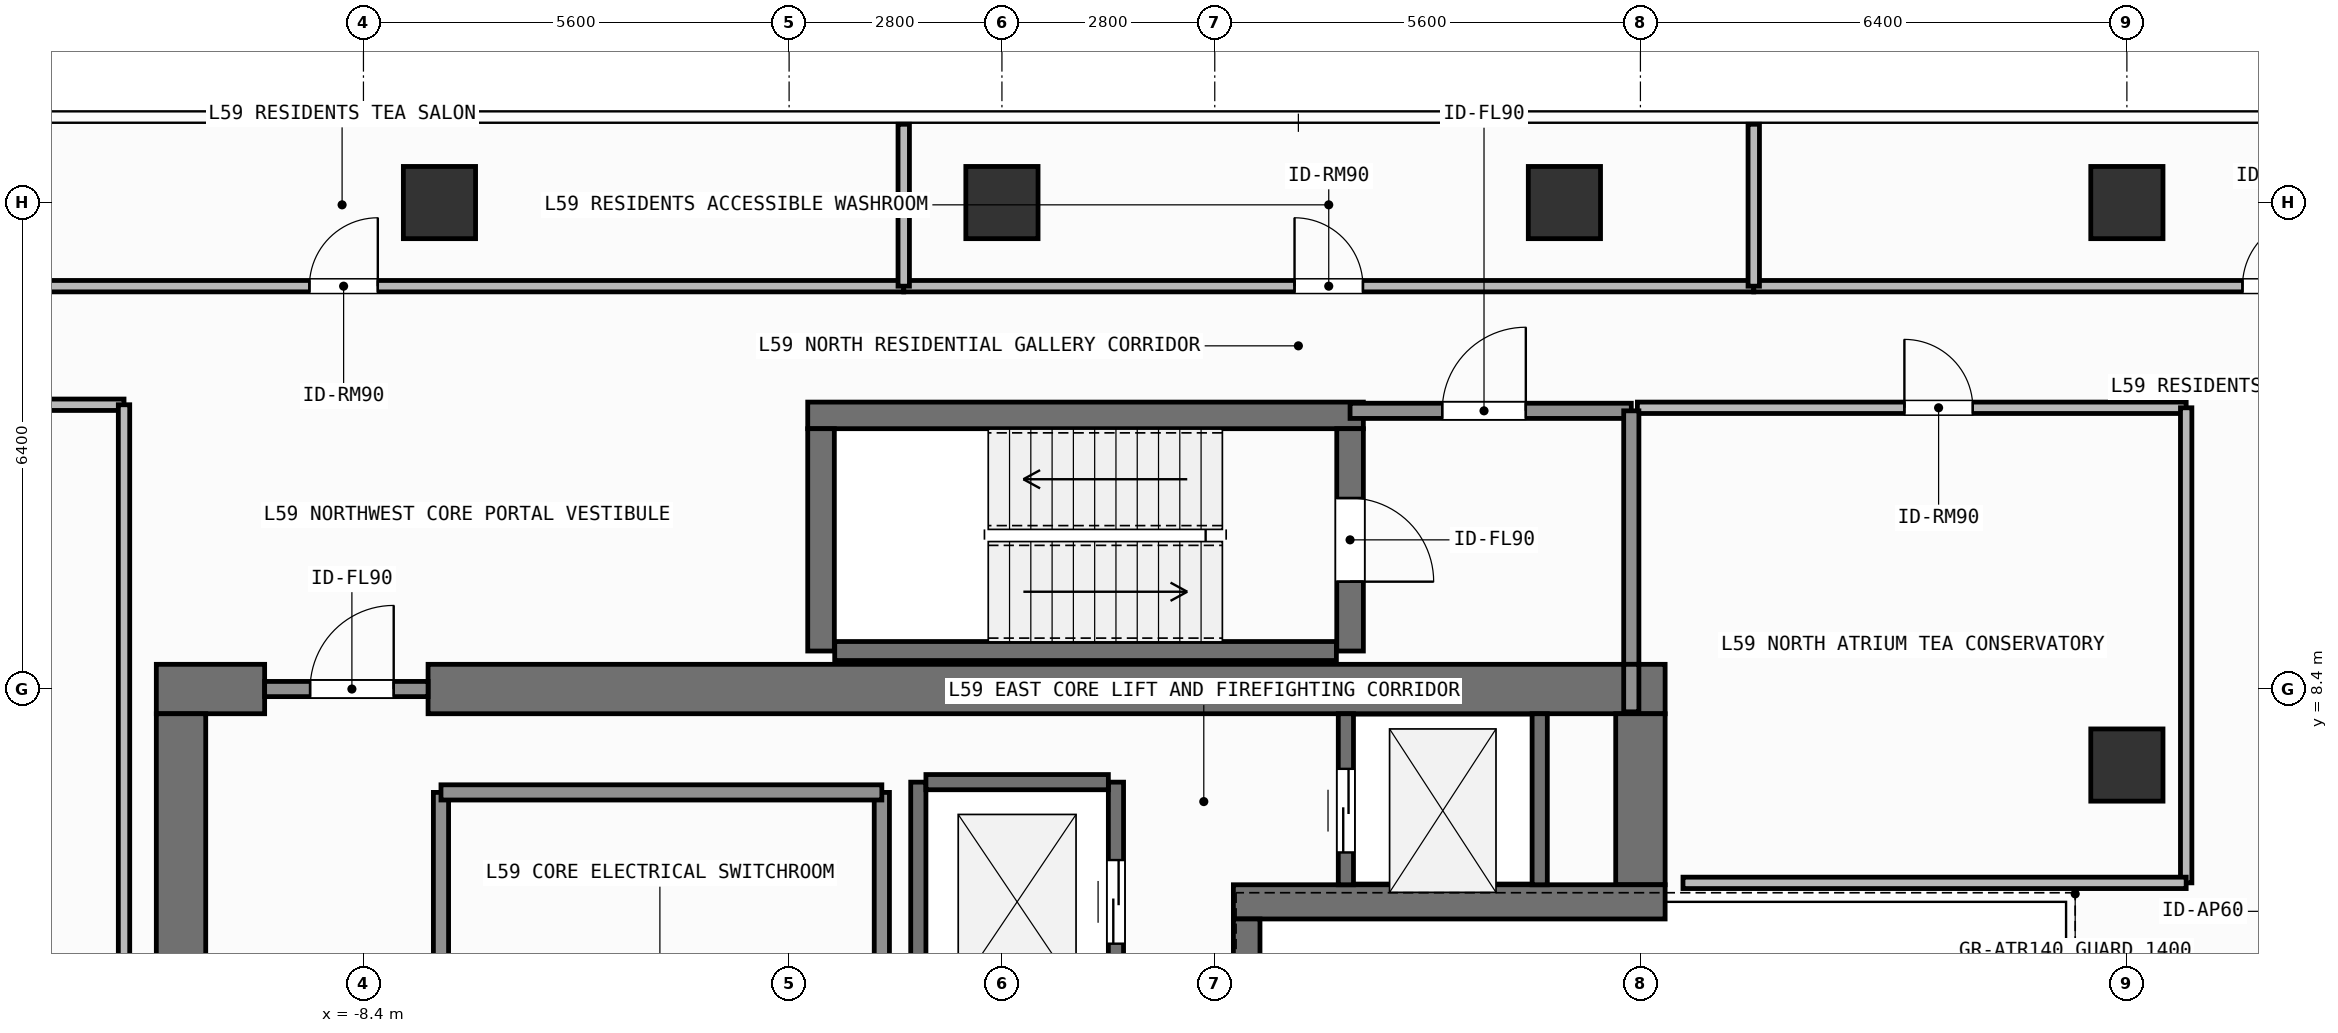
"""IFC4 building model, lengths in metres.
Left out: names, types, materials, properties, quantities, classifications, styles, units other than length and angle.
Written with IfcOpenShell. Run it as: python <this file> out.ifc"""

import sys

from ifc_helpers import new_model, si_unit, direction, frame, frame_2d, origin, origin_2d, place, context, subcontext, project, spatial, rectangle, extrude, element, fill, save


model = new_model("IFC4")
c1 = context("Model", 3, precision=1e-05, world=origin(), true_north=direction((0.0, 1.0)))
c2 = subcontext(c1, "Body", "Model", "MODEL_VIEW")
j1 = project(units=[si_unit("LENGTHUNIT", "METRE"), si_unit("PLANEANGLEUNIT", "RADIAN")], contexts=[c1])
p1 = place(None, origin())
s1 = spatial("IfcSite", under=j1, at=p1, CompositionType="ELEMENT")
p2 = place(p1, origin())
s2 = spatial("IfcBuilding", under=s1, at=p2, CompositionType="ELEMENT")
p3 = place(p2, frame((0.0, 0.0, 243.0)))
s3 = spatial("IfcBuildingStorey", under=s2, at=p3, CompositionType="ELEMENT", Elevation=243.0)
p4 = place(p3, frame((-11.125, 8.4, 0.0), z_axis=(0.0, 0.0, 1.0), x_axis=(1.0, 0.0, 0.0)))
e1 = element("IfcWall", 1, at=p4, inside=s3, PredefinedType="SHEAR", context=c2, shape_type="SweptSolid", body=[
    extrude(rectangle(XDim=1.425, YDim=0.65, at=frame_2d((0.712, 0.0))), origin(), (0.0, 0.0, 1.0), 3.9),
])
p5 = place(p3, frame((-7.55, 8.4, 0.0), z_axis=(0.0, 0.0, 1.0), x_axis=(1.0, 0.0, 0.0)))
e2 = element("IfcWall", 2, at=p5, inside=s3, PredefinedType="SHEAR", context=c2, shape_type="SweptSolid", body=[
    extrude(rectangle(XDim=16.275, YDim=0.65, at=frame_2d((8.138, 0.0))), origin(), (0.0, 0.0, 1.0), 3.9),
])
p6 = place(p3, frame((-10.8, -8.075, 0.0), z_axis=(0.0, 0.0, 1.0), x_axis=(0.0, 1.0, 0.0)))
e3 = element("IfcWall", 3, at=p6, inside=s3, PredefinedType="SHEAR", context=c2, shape_type="SweptSolid", body=[
    extrude(rectangle(XDim=16.15, YDim=0.65, at=frame_2d((8.075, 0.0))), origin(), (0.0, 0.0, 1.0), 3.9),
])
p7 = place(p3, frame((8.4, 5.825, 0.0), z_axis=(0.0, 0.0, 1.0), x_axis=(0.0, 1.0, 0.0)))
e4 = element("IfcWall", 4, at=p7, inside=s3, PredefinedType="SHEAR", context=c2, shape_type="SweptSolid", body=[
    extrude(rectangle(XDim=2.25, YDim=0.65, at=frame_2d((1.125, 0.0))), origin(), (0.0, 0.0, 1.0), 3.9),
])
p8 = place(p3, frame((3.045, 5.6, 0.0), z_axis=(0.0, 0.0, 1.0), x_axis=(1.0, 0.0, 0.0)))
e5 = element("IfcWall", 5, at=p8, inside=s3, PredefinedType="SHEAR", context=c2, shape_type="SweptSolid", body=[
    extrude(rectangle(XDim=5.68, YDim=0.45, at=frame_2d((2.84, 0.0))), origin(), (0.0, 0.0, 1.0), 3.9),
])
p9 = place(p3, frame((3.22, -5.375, 0.0), z_axis=(0.0, 0.0, 1.0), x_axis=(0.0, 1.0, 0.0)))
e6 = element("IfcWall", 6, at=p9, inside=s3, PredefinedType="SHEAR", context=c2, shape_type="SweptSolid", body=[
    extrude(rectangle(XDim=10.75, YDim=0.35, at=frame_2d((5.375, 0.0))), origin(), (0.0, 0.0, 1.0), 3.9),
])
p10 = place(p3, frame((-2.555, 12.0, 0.0), z_axis=(0.0, 0.0, 1.0), x_axis=(1.0, 0.0, 0.0)))
e7 = element("IfcWall", 7, at=p10, inside=s3, PredefinedType="SHEAR", context=c2, shape_type="SweptSolid", body=[
    extrude(rectangle(XDim=7.31, YDim=0.35, at=frame_2d((3.655, 0.0))), origin(), (0.0, 0.0, 1.0), 3.9),
])
p11 = place(p3, frame((-2.2, 8.9, 0.0), z_axis=(0.0, 0.0, 1.0), x_axis=(1.0, 0.0, 0.0)))
e8 = element("IfcWall", 8, at=p11, inside=s3, PredefinedType="SHEAR", context=c2, shape_type="SweptSolid", body=[
    extrude(rectangle(XDim=6.6, YDim=0.25, at=frame_2d((3.3, 0.0))), origin(), (0.0, 0.0, 1.0), 3.9),
])
p12 = place(p3, frame((-2.38, 8.9, 0.0), z_axis=(0.0, 0.0, 1.0), x_axis=(0.0, 1.0, 0.0)))
e9 = element("IfcWall", 9, at=p12, inside=s3, PredefinedType="SHEAR", context=c2, shape_type="SweptSolid", body=[
    extrude(rectangle(XDim=2.925, YDim=0.35, at=frame_2d((1.462, 0.0))), origin(), (0.0, 0.0, 1.0), 3.9),
])
p13 = place(p3, frame((4.58, 11.825, 0.0), z_axis=(0.0, 0.0, 1.0), x_axis=(0.0, -1.0, 0.0)))
e10 = element("IfcWall", 10, at=p13, inside=s3, PredefinedType="SHEAR", context=c2, shape_type="SweptSolid", body=[
    extrude(rectangle(XDim=2.925, YDim=0.35, at=frame_2d((1.462, 0.0))), origin(), (0.0, 0.0, 1.0), 3.9),
])
p14 = place(p13, frame((0.913, 0.0, 0.0)))
e11 = element("IfcOpeningElement", 11, at=p14, cuts=e10, PredefinedType="OPENING", context=c2, shape_type="SweptSolid", body=[
    extrude(rectangle(XDim=1.1, YDim=2.15, at=frame_2d((0.55, 1.075))), frame((0.0, 0.185, 0.0), z_axis=(0.0, -1.0, 0.0), x_axis=(1.0, 0.0, 0.0)), (0.0, 0.0, 1.0), 0.37),
])
for number, where, z_axis, x_axis in (
    (12, (-7.4, 14.8, 0.0), (0.0, 0.0, 1.0), (1.0, 0.0, 0.0)),
    (13, (0.0, 14.8, 0.0), (0.0, 0.0, 1.0), (1.0, 0.0, 0.0)),
    (14, (7.4, 14.8, 0.0), (0.0, 0.0, 1.0), (1.0, 0.0, 0.0)),
    (15, (14.8, 14.8, 0.0), (0.0, 0.0, 1.0), (1.0, 0.0, 0.0)),
    (16, (14.8, 7.4, 0.0), (0.0, 0.0, 1.0), (1.0, 0.0, 0.0)),
):
    element("IfcColumn", number, at=place(p3, frame(where, z_axis=z_axis, x_axis=x_axis)), inside=s3, PredefinedType="COLUMN", context=c2, shape_type="SweptSolid", body=[
        extrude(rectangle(XDim=0.95, YDim=0.95, at=origin_2d()), origin(), (0.0, 0.0, 1.0), 3.9),
    ])
p15 = place(p3, frame((-1.1, 4.025, 0.0), z_axis=(0.0, 0.0, 1.0), x_axis=(0.0, 1.0, 0.0)))
e17 = element("IfcWall", 17, at=p15, inside=s3, PredefinedType="SHEAR", context=c2, shape_type="SweptSolid", body=[
    extrude(rectangle(XDim=3.15, YDim=0.2, at=frame_2d((1.575, 0.0))), origin(), (0.0, 0.0, 1.0), 3.68),
])
p16 = place(p3, frame((1.5, 4.025, 0.0), z_axis=(0.0, 0.0, 1.0), x_axis=(0.0, 1.0, 0.0)))
e18 = element("IfcWall", 18, at=p16, inside=s3, PredefinedType="SHEAR", context=c2, shape_type="SweptSolid", body=[
    extrude(rectangle(XDim=3.15, YDim=0.2, at=frame_2d((1.575, 0.0))), origin(), (0.0, 0.0, 1.0), 3.68),
])
p17 = place(p16, frame((1.025, 0.0, 0.0)))
e19 = element("IfcOpeningElement", 19, at=p17, cuts=e18, PredefinedType="OPENING", context=c2, shape_type="SweptSolid", body=[
    extrude(rectangle(XDim=1.1, YDim=2.2, at=frame_2d((0.55, 1.1))), frame((0.0, 0.11, 0.0), z_axis=(0.0, -1.0, 0.0), x_axis=(1.0, 0.0, 0.0)), (0.0, 0.0, 1.0), 0.22),
])
p18 = place(p3, frame((-1.0, 7.175, 0.0), z_axis=(0.0, 0.0, 1.0), x_axis=(1.0, 0.0, 0.0)))
e20 = element("IfcWall", 20, at=p18, inside=s3, PredefinedType="SHEAR", context=c2, shape_type="SweptSolid", body=[
    extrude(rectangle(XDim=2.4, YDim=0.2, at=frame_2d((1.2, 0.0))), origin(), (0.0, 0.0, 1.0), 3.68),
])
p19 = place(p3, frame((4.525, 5.825, 0.0), z_axis=(0.0, 0.0, 1.0), x_axis=(0.0, 1.0, 0.0)))
e21 = element("IfcWall", 21, at=p19, inside=s3, PredefinedType="SHEAR", context=c2, shape_type="SweptSolid", body=[
    extrude(rectangle(XDim=2.25, YDim=0.2, at=frame_2d((1.125, 0.0))), origin(), (0.0, 0.0, 1.0), 3.68),
])
p20 = place(p19, frame((0.425, 0.0, 0.0)))
e22 = element("IfcOpeningElement", 22, at=p20, cuts=e21, PredefinedType="OPENING", context=c2, shape_type="SweptSolid", body=[
    extrude(rectangle(XDim=1.1, YDim=2.2, at=frame_2d((0.55, 1.1))), frame((0.0, 0.11, 0.0), z_axis=(0.0, -1.0, 0.0), x_axis=(1.0, 0.0, 0.0)), (0.0, 0.0, 1.0), 0.22),
])
p21 = place(p3, frame((7.075, 5.825, 0.0), z_axis=(0.0, 0.0, 1.0), x_axis=(0.0, 1.0, 0.0)))
e23 = element("IfcWall", 23, at=p21, inside=s3, PredefinedType="SHEAR", context=c2, shape_type="SweptSolid", body=[
    extrude(rectangle(XDim=2.25, YDim=0.2, at=frame_2d((1.125, 0.0))), origin(), (0.0, 0.0, 1.0), 3.68),
])
p22 = place(p3, frame((4.58, 12.06, 0.0), z_axis=(0.0, 0.0, 1.0), x_axis=(1.0, 0.0, 0.0)))
e24 = element("IfcWall", 24, at=p22, inside=s3, PredefinedType="SOLIDWALL", context=c2, shape_type="SweptSolid", body=[
    extrude(rectangle(XDim=3.7, YDim=0.2, at=frame_2d((1.85, 0.0))), origin(), (0.0, 0.0, 1.0), 3.68),
])
p23 = place(p22, frame((1.212, 0.0, 0.0)))
e25 = element("IfcOpeningElement", 25, at=p23, cuts=e24, PredefinedType="OPENING", context=c2, shape_type="SweptSolid", body=[
    extrude(rectangle(XDim=1.1, YDim=2.15, at=frame_2d((0.55, 1.075))), frame((0.0, 0.11, 0.0), z_axis=(0.0, -1.0, 0.0), x_axis=(1.0, 0.0, 0.0)), (0.0, 0.0, 1.0), 0.22),
])
p24 = place(p3, frame((-9.7, 8.4, 0.0), z_axis=(0.0, 0.0, 1.0), x_axis=(1.0, 0.0, 0.0)))
e26 = element("IfcWall", 26, at=p24, inside=s3, PredefinedType="SOLIDWALL", context=c2, shape_type="SweptSolid", body=[
    extrude(rectangle(XDim=2.15, YDim=0.2, at=frame_2d((1.075, 0.0))), origin(), (0.0, 0.0, 1.0), 2.92),
])
p25 = place(p24, frame((0.598, 0.0, 0.0)))
e27 = element("IfcOpeningElement", 27, at=p25, cuts=e26, PredefinedType="OPENING", context=c2, shape_type="SweptSolid", body=[
    extrude(rectangle(XDim=1.1, YDim=2.15, at=frame_2d((0.55, 1.075))), frame((0.0, 0.11, 0.0), z_axis=(0.0, -1.0, 0.0), x_axis=(1.0, 0.0, 0.0)), (0.0, 0.0, 1.0), 0.22),
])
p26 = place(p3, frame((-7.38, 1.3, 0.0), z_axis=(0.0, 0.0, 1.0), x_axis=(0.0, 1.0, 0.0)))
e28 = element("IfcWall", 28, at=p26, inside=s3, PredefinedType="SOLIDWALL", context=c2, shape_type="SweptSolid", body=[
    extrude(rectangle(XDim=5.74, YDim=0.2, at=frame_2d((2.87, 0.0))), origin(), (0.0, 0.0, 1.0), 3.68),
])
p27 = place(p26, frame((2.41, 0.0, 0.0)))
e29 = element("IfcOpeningElement", 29, at=p27, cuts=e28, PredefinedType="OPENING", context=c2, shape_type="SweptSolid", body=[
    extrude(rectangle(XDim=0.92, YDim=2.1, at=frame_2d((0.46, 1.05))), frame((0.0, 0.11, 0.0), z_axis=(0.0, -1.0, 0.0), x_axis=(1.0, 0.0, 0.0)), (0.0, 0.0, 1.0), 0.22),
])
p28 = place(p3, frame((8.36, 12.1, 0.0), z_axis=(0.0, 0.0, 1.0), x_axis=(1.0, 0.0, 0.0)))
e30 = element("IfcWall", 30, at=p28, inside=s3, PredefinedType="PARTITIONING", context=c2, shape_type="SweptSolid", body=[
    extrude(rectangle(XDim=7.22, YDim=0.15, at=frame_2d((3.61, 0.0))), origin(), (0.0, 0.0, 1.0), 3.68),
])
p29 = place(p28, frame((3.513, 0.0, 0.0)))
e31 = element("IfcOpeningElement", 31, at=p29, cuts=e30, PredefinedType="OPENING", context=c2, shape_type="SweptSolid", body=[
    extrude(rectangle(XDim=0.9, YDim=2.1, at=frame_2d((0.45, 1.05))), frame((0.0, 0.085, 0.0), z_axis=(0.0, -1.0, 0.0), x_axis=(1.0, 0.0, 0.0)), (0.0, 0.0, 1.0), 0.17),
])
p30 = place(p3, frame((-16.03, 13.7, 0.0), z_axis=(0.0, 0.0, 1.0), x_axis=(1.0, 0.0, 0.0)))
e32 = element("IfcWall", 32, at=p30, inside=s3, PredefinedType="PARTITIONING", context=c2, shape_type="SweptSolid", body=[
    extrude(rectangle(XDim=14.738, YDim=0.15, at=frame_2d((7.369, 0.0))), origin(), (0.0, 0.0, 1.0), 3.68),
])
p31 = place(p30, frame((6.919, 0.0, 0.0)))
e33 = element("IfcOpeningElement", 33, at=p31, cuts=e32, PredefinedType="OPENING", context=c2, shape_type="SweptSolid", body=[
    extrude(rectangle(XDim=0.9, YDim=2.1, at=frame_2d((0.45, 1.05))), frame((0.0, 0.085, 0.0), z_axis=(0.0, -1.0, 0.0), x_axis=(1.0, 0.0, 0.0)), (0.0, 0.0, 1.0), 0.17),
])
p32 = place(p3, frame((-1.292, 13.7, 0.0), z_axis=(0.0, 0.0, 1.0), x_axis=(1.0, 0.0, 0.0)))
e34 = element("IfcWall", 34, at=p32, inside=s3, PredefinedType="PARTITIONING", context=c2, shape_type="SweptSolid", body=[
    extrude(rectangle(XDim=11.183, YDim=0.15, at=frame_2d((5.592, 0.0))), origin(), (0.0, 0.0, 1.0), 3.68),
])
p33 = place(p32, frame((5.142, 0.0, 0.0)))
e35 = element("IfcOpeningElement", 35, at=p33, cuts=e34, PredefinedType="OPENING", context=c2, shape_type="SweptSolid", body=[
    extrude(rectangle(XDim=0.9, YDim=2.1, at=frame_2d((0.45, 1.05))), frame((0.0, 0.085, 0.0), z_axis=(0.0, -1.0, 0.0), x_axis=(1.0, 0.0, 0.0)), (0.0, 0.0, 1.0), 0.17),
])
p34 = place(p3, frame((9.891, 13.7, 0.0), z_axis=(0.0, 0.0, 1.0), x_axis=(1.0, 0.0, 0.0)))
e36 = element("IfcWall", 36, at=p34, inside=s3, PredefinedType="PARTITIONING", context=c2, shape_type="SweptSolid", body=[
    extrude(rectangle(XDim=13.939, YDim=0.15, at=frame_2d((6.969, 0.0))), origin(), (0.0, 0.0, 1.0), 3.68),
])
p35 = place(p34, frame((6.43, 0.0, 0.0)))
e37 = element("IfcOpeningElement", 37, at=p35, cuts=e36, PredefinedType="OPENING", context=c2, shape_type="SweptSolid", body=[
    extrude(rectangle(XDim=0.9, YDim=2.1, at=frame_2d((0.45, 1.05))), frame((0.0, 0.085, 0.0), z_axis=(0.0, -1.0, 0.0), x_axis=(1.0, 0.0, 0.0)), (0.0, 0.0, 1.0), 0.17),
])
p36 = place(p3, frame((-17.59, 12.14, 0.0), z_axis=(0.0, 0.0, 1.0), x_axis=(1.0, 0.0, 0.0)))
e38 = element("IfcWall", 38, at=p36, inside=s3, PredefinedType="PARTITIONING", context=c2, shape_type="SweptSolid", body=[
    extrude(rectangle(XDim=6.04, YDim=0.15, at=frame_2d((3.02, 0.0))), origin(), (0.0, 0.0, 1.0), 3.68),
])
p37 = place(p36, frame((2.481, 0.0, 0.0)))
e39 = element("IfcOpeningElement", 39, at=p37, cuts=e38, PredefinedType="OPENING", context=c2, shape_type="SweptSolid", body=[
    extrude(rectangle(XDim=0.9, YDim=2.1, at=frame_2d((0.45, 1.05))), frame((0.0, 0.085, 0.0), z_axis=(0.0, -1.0, 0.0), x_axis=(1.0, 0.0, 0.0)), (0.0, 0.0, 1.0), 0.17),
])
p38 = place(p3, frame((8.28, 8.725, 0.0), z_axis=(0.0, 0.0, 1.0), x_axis=(0.0, 1.0, 0.0)))
e40 = element("IfcWall", 40, at=p38, inside=s3, PredefinedType="SOLIDWALL", context=c2, shape_type="SweptSolid", body=[
    extrude(rectangle(XDim=3.335, YDim=0.2, at=frame_2d((1.667, 0.0))), origin(), (0.0, 0.0, 1.0), 3.68),
])
p39 = place(p3, frame((-1.58, 1.3, 0.0), z_axis=(0.0, 0.0, 1.0), x_axis=(0.0, 1.0, 0.0)))
e41 = element("IfcWall", 41, at=p39, inside=s3, PredefinedType="SOLIDWALL", context=c2, shape_type="SweptSolid", body=[
    extrude(rectangle(XDim=5.74, YDim=0.2, at=frame_2d((2.87, 0.0))), origin(), (0.0, 0.0, 1.0), 3.68),
])
p40 = place(p3, frame((-7.38, 7.04, 0.0), z_axis=(0.0, 0.0, 1.0), x_axis=(1.0, 0.0, 0.0)))
e42 = element("IfcWall", 42, at=p40, inside=s3, PredefinedType="SOLIDWALL", context=c2, shape_type="SweptSolid", body=[
    extrude(rectangle(XDim=5.8, YDim=0.2, at=frame_2d((2.9, 0.0))), origin(), (0.0, 0.0, 1.0), 3.68),
])
p41 = place(p3, frame((8.28, 8.1, 0.0), z_axis=(0.0, 0.0, 1.0), x_axis=(0.0, 1.0, 0.0)))
e43 = element("IfcWall", 43, at=p41, inside=s3, PredefinedType="SOLIDWALL", context=c2, shape_type="SweptSolid", body=[
    extrude(rectangle(XDim=0.625, YDim=0.2, at=frame_2d((0.312, 0.0))), origin(), (0.0, 0.0, 1.0), 3.68),
])
p42 = place(p3, frame((15.58, 5.85, 0.0), z_axis=(0.0, 0.0, 1.0), x_axis=(0.0, 1.0, 0.0)))
e44 = element("IfcWall", 44, at=p42, inside=s3, PredefinedType="PARTITIONING", context=c2, shape_type="SweptSolid", body=[
    extrude(rectangle(XDim=6.25, YDim=0.15, at=frame_2d((3.125, 0.0))), origin(), (0.0, 0.0, 1.0), 3.68),
])
p43 = place(p3, frame((8.96, 5.85, 0.0), z_axis=(0.0, 0.0, 1.0), x_axis=(1.0, 0.0, 0.0)))
e45 = element("IfcWall", 45, at=p43, inside=s3, PredefinedType="PARTITIONING", context=c2, shape_type="SweptSolid", body=[
    extrude(rectangle(XDim=6.62, YDim=0.15, at=frame_2d((3.31, 0.0))), origin(), (0.0, 0.0, 1.0), 3.68),
])
for number, where, z_axis, x_axis in (
    (46, (-1.292, 13.7, 0.0), (0.0, 0.0, 1.0), (0.0, 1.0, 0.0)),
    (47, (9.891, 13.7, 0.0), (0.0, 0.0, 1.0), (0.0, 1.0, 0.0)),
):
    element("IfcWall", number, at=place(p3, frame(where, z_axis=z_axis, x_axis=x_axis)), inside=s3, PredefinedType="PARTITIONING", context=c2, shape_type="SweptSolid", body=[
        extrude(rectangle(XDim=2.13, YDim=0.15, at=frame_2d((1.065, 0.0))), origin(), (0.0, 0.0, 1.0), 3.68),
    ])
p44 = place(p3, frame((-11.55, 2.95, 0.0), z_axis=(0.0, 0.0, 1.0), x_axis=(0.0, 1.0, 0.0)))
e48 = element("IfcWall", 48, at=p44, inside=s3, PredefinedType="PARTITIONING", context=c2, shape_type="SweptSolid", body=[
    extrude(rectangle(XDim=9.19, YDim=0.15, at=frame_2d((4.595, 0.0))), origin(), (0.0, 0.0, 1.0), 3.68),
])
p45 = place(p17, origin())
e49 = element("IfcDoor", 49, at=p45, inside=s3, OperationType="SLIDING_TO_LEFT", PredefinedType="DOOR", context=c2, shape_type="SweptSolid", body=[
    extrude(rectangle(XDim=1.1, YDim=2.2, at=frame_2d((0.55, 1.1))), frame((0.0, 0.025, 0.0), z_axis=(0.0, -1.0, 0.0), x_axis=(1.0, 0.0, 0.0)), (0.0, 0.0, 1.0), 0.05),
])
fill(e19, e49)
p46 = place(p20, origin())
e50 = element("IfcDoor", 50, at=p46, inside=s3, OperationType="SLIDING_TO_LEFT", PredefinedType="DOOR", context=c2, shape_type="SweptSolid", body=[
    extrude(rectangle(XDim=1.1, YDim=2.2, at=frame_2d((0.55, 1.1))), frame((0.0, 0.025, 0.0), z_axis=(0.0, -1.0, 0.0), x_axis=(1.0, 0.0, 0.0)), (0.0, 0.0, 1.0), 0.05),
])
fill(e22, e50)
p47 = place(p14, origin())
e51 = element("IfcDoor", 51, at=p47, inside=s3, OperationType="SINGLE_SWING_RIGHT", PredefinedType="DOOR", context=c2, shape_type="SweptSolid", body=[
    extrude(rectangle(XDim=1.1, YDim=2.15, at=frame_2d((0.55, 1.075))), frame((0.0, 0.025, 0.0), z_axis=(0.0, -1.0, 0.0), x_axis=(1.0, 0.0, 0.0)), (0.0, 0.0, 1.0), 0.05),
])
fill(e11, e51)
p48 = place(p23, origin())
e52 = element("IfcDoor", 52, at=p48, inside=s3, OperationType="SINGLE_SWING_RIGHT", PredefinedType="DOOR", context=c2, shape_type="SweptSolid", body=[
    extrude(rectangle(XDim=1.1, YDim=2.15, at=frame_2d((0.55, 1.075))), frame((0.0, 0.025, 0.0), z_axis=(0.0, -1.0, 0.0), x_axis=(1.0, 0.0, 0.0)), (0.0, 0.0, 1.0), 0.05),
])
fill(e25, e52)
p49 = place(p25, origin())
e53 = element("IfcDoor", 53, at=p49, inside=s3, OperationType="SINGLE_SWING_RIGHT", PredefinedType="DOOR", context=c2, shape_type="SweptSolid", body=[
    extrude(rectangle(XDim=1.1, YDim=2.15, at=frame_2d((0.55, 1.075))), frame((0.0, 0.025, 0.0), z_axis=(0.0, -1.0, 0.0), x_axis=(1.0, 0.0, 0.0)), (0.0, 0.0, 1.0), 0.05),
])
fill(e27, e53)
p50 = place(p29, origin())
e54 = element("IfcDoor", 54, at=p50, inside=s3, OperationType="SINGLE_SWING_LEFT", PredefinedType="DOOR", context=c2, shape_type="SweptSolid", body=[
    extrude(rectangle(XDim=0.9, YDim=2.1, at=frame_2d((0.45, 1.05))), frame((0.0, 0.025, 0.0), z_axis=(0.0, -1.0, 0.0), x_axis=(1.0, 0.0, 0.0)), (0.0, 0.0, 1.0), 0.05),
])
fill(e31, e54)
p51 = place(p31, origin())
e55 = element("IfcDoor", 55, at=p51, inside=s3, OperationType="SINGLE_SWING_RIGHT", PredefinedType="DOOR", context=c2, shape_type="SweptSolid", body=[
    extrude(rectangle(XDim=0.9, YDim=2.1, at=frame_2d((0.45, 1.05))), frame((0.0, 0.025, 0.0), z_axis=(0.0, -1.0, 0.0), x_axis=(1.0, 0.0, 0.0)), (0.0, 0.0, 1.0), 0.05),
])
fill(e33, e55)
p52 = place(p33, origin())
e56 = element("IfcDoor", 56, at=p52, inside=s3, OperationType="SINGLE_SWING_LEFT", PredefinedType="DOOR", context=c2, shape_type="SweptSolid", body=[
    extrude(rectangle(XDim=0.9, YDim=2.1, at=frame_2d((0.45, 1.05))), frame((0.0, 0.025, 0.0), z_axis=(0.0, -1.0, 0.0), x_axis=(1.0, 0.0, 0.0)), (0.0, 0.0, 1.0), 0.05),
])
fill(e35, e56)
p53 = place(p35, origin())
e57 = element("IfcDoor", 57, at=p53, inside=s3, OperationType="SINGLE_SWING_RIGHT", PredefinedType="DOOR", context=c2, shape_type="SweptSolid", body=[
    extrude(rectangle(XDim=0.9, YDim=2.1, at=frame_2d((0.45, 1.05))), frame((0.0, 0.025, 0.0), z_axis=(0.0, -1.0, 0.0), x_axis=(1.0, 0.0, 0.0)), (0.0, 0.0, 1.0), 0.05),
])
fill(e37, e57)
save(model, sys.argv[1])
